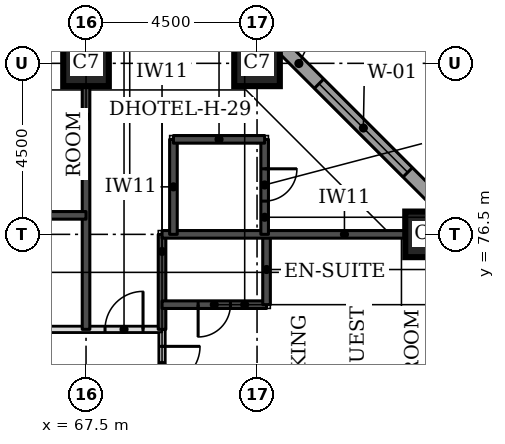
"""IFC4 building model, lengths in metres.
Left out: names, types, materials, properties, quantities, classifications, styles, units other than length and angle.
Written with IfcOpenShell. Run it as: python <this file> out.ifc"""

import sys

from ifc_helpers import new_model, si_unit, direction, frame, frame_2d, origin, origin_2d, place, context, subcontext, project, spatial, rectangle, extrude, element, fill, save


model = new_model("IFC4")
c1 = context("Model", 3, precision=1e-05, world=origin(), true_north=direction((0.0, 1.0)))
c2 = subcontext(c1, "Body", "Model", "MODEL_VIEW")
j1 = project(units=[si_unit("LENGTHUNIT", "METRE"), si_unit("PLANEANGLEUNIT", "RADIAN")], contexts=[c1])
p1 = place(None, origin())
s1 = spatial("IfcSite", under=j1, at=p1, CompositionType="ELEMENT")
p2 = place(p1, origin())
s2 = spatial("IfcBuilding", under=s1, at=p2, CompositionType="ELEMENT")
p3 = place(p2, frame((0.0, 0.0, 46.2)))
s3 = spatial("IfcBuildingStorey", under=s2, at=p3, CompositionType="ELEMENT", Elevation=46.2)
for number, where, z_axis, x_axis in (
    (1, (76.5, 76.5, 0.0), (0.0, 0.0, 1.0), (1.0, 0.0, 0.0)),
    (2, (67.5, 81.0, 0.0), (0.0, 0.0, 1.0), (1.0, 0.0, 0.0)),
    (3, (72.0, 81.0, 0.0), (0.0, 0.0, 1.0), (1.0, 0.0, 0.0)),
):
    element("IfcColumn", number, at=place(p3, frame(where, z_axis=z_axis, x_axis=x_axis)), inside=s3, PredefinedType="COLUMN", context=c2, shape_type="SweptSolid", body=[
        extrude(rectangle(XDim=1.2, YDim=1.2, at=origin_2d()), origin(), (0.0, 0.0, 1.0), 3.3),
    ])
p4 = place(p3, frame((77.326, 76.77, 0.0), z_axis=(0.0, 0.0, 1.0), x_axis=(-0.707106781187, 0.707106781187, 0.0)))
e4 = element("IfcWall", 4, at=p4, inside=s3, PredefinedType="STANDARD", context=c2, shape_type="SweptSolid", body=[
    extrude(rectangle(XDim=7.151, YDim=0.35, at=frame_2d((3.576, 0.0))), origin(), (0.0, 0.0, 1.0), 3.055),
])
p5 = place(p4, frame((1.926, 0.0, 0.8)))
e5 = element("IfcOpeningElement", 5, at=p5, cuts=e4, PredefinedType="OPENING", context=c2, shape_type="SweptSolid", body=[
    extrude(rectangle(XDim=3.3, YDim=1.5, at=frame_2d((1.65, 0.75))), frame((0.0, 0.185, 0.0), z_axis=(0.0, -1.0, 0.0), x_axis=(1.0, 0.0, 0.0)), (0.0, 0.0, 1.0), 0.37),
])
p6 = place(p3, frame((69.5, 47.5, 0.0), z_axis=(0.0, 0.0, 1.0), x_axis=(0.0, 1.0, 0.0)))
e6 = element("IfcWall", 6, at=p6, inside=s3, PredefinedType="PARTITIONING", context=c2, shape_type="SweptSolid", body=[
    extrude(rectangle(XDim=26.5, YDim=0.15, at=frame_2d((13.25, 0.0))), origin(), (0.0, 0.0, 1.0), 3.08),
])
p7 = place(p6, frame((25.053, 0.0, 0.0)))
e7 = element("IfcOpeningElement", 7, at=p7, cuts=e6, PredefinedType="OPENING", context=c2, shape_type="SweptSolid", body=[
    extrude(rectangle(XDim=1.0, YDim=2.1, at=frame_2d((0.5, 1.05))), frame((0.0, 0.085, 0.0), z_axis=(0.0, -1.0, 0.0), x_axis=(1.0, 0.0, 0.0)), (0.0, 0.0, 1.0), 0.17),
])
p8 = place(p6, frame((20.575, 0.0, 0.0)))
e8 = element("IfcOpeningElement", 8, at=p8, cuts=e6, PredefinedType="OPENING", context=c2, shape_type="SweptSolid", body=[
    extrude(rectangle(XDim=1.0, YDim=2.1, at=frame_2d((0.5, 1.05))), frame((0.0, 0.085, 0.0), z_axis=(0.0, -1.0, 0.0), x_axis=(1.0, 0.0, 0.0)), (0.0, 0.0, 1.0), 0.17),
])
p9 = place(p6, frame((18.175, 0.0, 0.0)))
e9 = element("IfcOpeningElement", 9, at=p9, cuts=e6, PredefinedType="OPENING", context=c2, shape_type="SweptSolid", body=[
    extrude(rectangle(XDim=1.0, YDim=2.1, at=frame_2d((0.5, 1.05))), frame((0.0, 0.085, 0.0), z_axis=(0.0, -1.0, 0.0), x_axis=(1.0, 0.0, 0.0)), (0.0, 0.0, 1.0), 0.17),
])
p10 = place(p6, frame((11.575, 0.0, 0.0)))
e10 = element("IfcOpeningElement", 10, at=p10, cuts=e6, PredefinedType="OPENING", context=c2, shape_type="SweptSolid", body=[
    extrude(rectangle(XDim=1.0, YDim=2.1, at=frame_2d((0.5, 1.05))), frame((0.0, 0.085, 0.0), z_axis=(0.0, -1.0, 0.0), x_axis=(1.0, 0.0, 0.0)), (0.0, 0.0, 1.0), 0.17),
])
p11 = place(p6, frame((7.65, 0.0, 0.0)))
e11 = element("IfcOpeningElement", 11, at=p11, cuts=e6, PredefinedType="OPENING", context=c2, shape_type="SweptSolid", body=[
    extrude(rectangle(XDim=1.1, YDim=2.1, at=frame_2d((0.55, 1.05))), frame((0.0, 0.085, 0.0), z_axis=(0.0, -1.0, 0.0), x_axis=(1.0, 0.0, 0.0)), (0.0, 0.0, 1.0), 0.17),
])
p12 = place(p6, frame((0.447, 0.0, 0.0)))
e12 = element("IfcOpeningElement", 12, at=p12, cuts=e6, PredefinedType="OPENING", context=c2, shape_type="SweptSolid", body=[
    extrude(rectangle(XDim=1.0, YDim=2.1, at=frame_2d((0.5, 1.05))), frame((0.0, 0.085, 0.0), z_axis=(0.0, -1.0, 0.0), x_axis=(1.0, 0.0, 0.0)), (0.0, 0.0, 1.0), 0.17),
])
p13 = place(p3, frame((43.0, 74.0, 0.0), z_axis=(0.0, 0.0, 1.0), x_axis=(1.0, 0.0, 0.0)))
e13 = element("IfcWall", 13, at=p13, inside=s3, PredefinedType="PARTITIONING", context=c2, shape_type="SweptSolid", body=[
    extrude(rectangle(XDim=26.5, YDim=0.15, at=frame_2d((13.25, 0.0))), origin(), (0.0, 0.0, 1.0), 3.08),
])
p14 = place(p13, frame((2.575, 0.0, 0.0)))
e14 = element("IfcOpeningElement", 14, at=p14, cuts=e13, PredefinedType="OPENING", context=c2, shape_type="SweptSolid", body=[
    extrude(rectangle(XDim=1.0, YDim=2.1, at=frame_2d((0.5, 1.05))), frame((0.0, 0.085, 0.0), z_axis=(0.0, -1.0, 0.0), x_axis=(1.0, 0.0, 0.0)), (0.0, 0.0, 1.0), 0.17),
])
p15 = place(p13, frame((9.175, 0.0, 0.0)))
e15 = element("IfcOpeningElement", 15, at=p15, cuts=e13, PredefinedType="OPENING", context=c2, shape_type="SweptSolid", body=[
    extrude(rectangle(XDim=1.0, YDim=2.1, at=frame_2d((0.5, 1.05))), frame((0.0, 0.085, 0.0), z_axis=(0.0, -1.0, 0.0), x_axis=(1.0, 0.0, 0.0)), (0.0, 0.0, 1.0), 0.17),
])
p16 = place(p13, frame((11.575, 0.0, 0.0)))
e16 = element("IfcOpeningElement", 16, at=p16, cuts=e13, PredefinedType="OPENING", context=c2, shape_type="SweptSolid", body=[
    extrude(rectangle(XDim=1.0, YDim=2.1, at=frame_2d((0.5, 1.05))), frame((0.0, 0.085, 0.0), z_axis=(0.0, -1.0, 0.0), x_axis=(1.0, 0.0, 0.0)), (0.0, 0.0, 1.0), 0.17),
])
p17 = place(p13, frame((18.175, 0.0, 0.0)))
e17 = element("IfcOpeningElement", 17, at=p17, cuts=e13, PredefinedType="OPENING", context=c2, shape_type="SweptSolid", body=[
    extrude(rectangle(XDim=1.0, YDim=2.1, at=frame_2d((0.5, 1.05))), frame((0.0, 0.085, 0.0), z_axis=(0.0, -1.0, 0.0), x_axis=(1.0, 0.0, 0.0)), (0.0, 0.0, 1.0), 0.17),
])
p18 = place(p13, frame((20.575, 0.0, 0.0)))
e18 = element("IfcOpeningElement", 18, at=p18, cuts=e13, PredefinedType="OPENING", context=c2, shape_type="SweptSolid", body=[
    extrude(rectangle(XDim=1.0, YDim=2.1, at=frame_2d((0.5, 1.05))), frame((0.0, 0.085, 0.0), z_axis=(0.0, -1.0, 0.0), x_axis=(1.0, 0.0, 0.0)), (0.0, 0.0, 1.0), 0.17),
])
p19 = place(p13, frame((0.5, 0.0, 0.0)))
e19 = element("IfcOpeningElement", 19, at=p19, cuts=e13, PredefinedType="OPENING", context=c2, shape_type="SweptSolid", body=[
    extrude(rectangle(XDim=1.0, YDim=2.1, at=frame_2d((0.5, 1.05))), frame((0.0, 0.085, 0.0), z_axis=(0.0, -1.0, 0.0), x_axis=(1.0, 0.0, 0.0)), (0.0, 0.0, 1.0), 0.17),
])
p20 = place(p13, frame((25.0, 0.0, 0.0)))
e20 = element("IfcOpeningElement", 20, at=p20, cuts=e13, PredefinedType="OPENING", context=c2, shape_type="SweptSolid", body=[
    extrude(rectangle(XDim=1.0, YDim=2.1, at=frame_2d((0.5, 1.05))), frame((0.0, 0.085, 0.0), z_axis=(0.0, -1.0, 0.0), x_axis=(1.0, 0.0, 0.0)), (0.0, 0.0, 1.0), 0.17),
])
p21 = place(p3, frame((67.5, 74.0, 0.0), z_axis=(0.0, 0.0, 1.0), x_axis=(0.0, 1.0, 0.0)))
e21 = element("IfcWall", 21, at=p21, inside=s3, PredefinedType="SOLIDWALL", context=c2, shape_type="SweptSolid", body=[
    extrude(rectangle(XDim=6.4, YDim=0.2, at=frame_2d((3.2, 0.0))), origin(), (0.0, 0.0, 1.0), 3.08),
])
p22 = place(p3, frame((69.5, 74.0, 0.0), z_axis=(0.0, 0.0, 1.0), x_axis=(0.0, 1.0, 0.0)))
e22 = element("IfcWall", 22, at=p22, inside=s3, PredefinedType="SOLIDWALL", context=c2, shape_type="SweptSolid", body=[
    extrude(rectangle(XDim=2.5, YDim=0.2, at=frame_2d((1.25, 0.0))), origin(), (0.0, 0.0, 1.0), 3.08),
])
p23 = place(p3, frame((69.5, 74.65, 0.0), z_axis=(0.0, 0.0, 1.0), x_axis=(1.0, 0.0, 0.0)))
e23 = element("IfcWall", 23, at=p23, inside=s3, PredefinedType="SOLIDWALL", context=c2, shape_type="SweptSolid", body=[
    extrude(rectangle(XDim=2.75, YDim=0.2, at=frame_2d((1.375, 0.0))), origin(), (0.0, 0.0, 1.0), 3.08),
])
p24 = place(p23, frame((0.95, 0.0, 0.0)))
e24 = element("IfcOpeningElement", 24, at=p24, cuts=e23, PredefinedType="OPENING", context=c2, shape_type="SweptSolid", body=[
    extrude(rectangle(XDim=0.85, YDim=2.1, at=frame_2d((0.425, 1.05))), frame((0.0, 0.11, 0.0), z_axis=(0.0, -1.0, 0.0), x_axis=(1.0, 0.0, 0.0)), (0.0, 0.0, 1.0), 0.22),
])
p25 = place(p3, frame((72.25, 74.65, 0.0), z_axis=(0.0, 0.0, 1.0), x_axis=(0.0, 1.0, 0.0)))
e25 = element("IfcWall", 25, at=p25, inside=s3, PredefinedType="SOLIDWALL", context=c2, shape_type="SweptSolid", body=[
    extrude(rectangle(XDim=1.85, YDim=0.2, at=frame_2d((0.925, 0.0))), origin(), (0.0, 0.0, 1.0), 3.08),
])
p26 = place(p3, frame((69.5, 76.5, 0.0), z_axis=(0.0, 0.0, 1.0), x_axis=(1.0, 0.0, 0.0)))
e26 = element("IfcWall", 26, at=p26, inside=s3, PredefinedType="SOLIDWALL", context=c2, shape_type="SweptSolid", body=[
    extrude(rectangle(XDim=6.4, YDim=0.2, at=frame_2d((3.2, 0.0))), origin(), (0.0, 0.0, 1.0), 3.08),
])
p27 = place(p3, frame((69.8, 76.5, 0.0), z_axis=(0.0, 0.0, 1.0), x_axis=(0.0, 1.0, 0.0)))
e27 = element("IfcWall", 27, at=p27, inside=s3, PredefinedType="SOLIDWALL", context=c2, shape_type="SweptSolid", body=[
    extrude(rectangle(XDim=2.5, YDim=0.2, at=frame_2d((1.25, 0.0))), origin(), (0.0, 0.0, 1.0), 3.08),
])
p28 = place(p3, frame((72.2, 76.5, 0.0), z_axis=(0.0, 0.0, 1.0), x_axis=(0.0, 1.0, 0.0)))
e28 = element("IfcWall", 28, at=p28, inside=s3, PredefinedType="SOLIDWALL", context=c2, shape_type="SweptSolid", body=[
    extrude(rectangle(XDim=2.5, YDim=0.2, at=frame_2d((1.25, 0.0))), origin(), (0.0, 0.0, 1.0), 3.08),
])
p29 = place(p28, frame((0.875, 0.0, 0.0)))
e29 = element("IfcOpeningElement", 29, at=p29, cuts=e28, PredefinedType="OPENING", context=c2, shape_type="SweptSolid", body=[
    extrude(rectangle(XDim=0.85, YDim=2.1, at=frame_2d((0.425, 1.05))), frame((0.0, 0.11, 0.0), z_axis=(0.0, -1.0, 0.0), x_axis=(1.0, 0.0, 0.0)), (0.0, 0.0, 1.0), 0.22),
])
p30 = place(p3, frame((65.15, 77.0, 0.0), z_axis=(0.0, 0.0, 1.0), x_axis=(1.0, 0.0, 0.0)))
e30 = element("IfcWall", 30, at=p30, inside=s3, PredefinedType="SOLIDWALL", context=c2, shape_type="SweptSolid", body=[
    extrude(rectangle(XDim=2.35, YDim=0.2, at=frame_2d((1.175, 0.0))), origin(), (0.0, 0.0, 1.0), 3.08),
])
p31 = place(p3, frame((69.8, 79.0, 0.0), z_axis=(0.0, 0.0, 1.0), x_axis=(1.0, 0.0, 0.0)))
e31 = element("IfcWall", 31, at=p31, inside=s3, PredefinedType="SOLIDWALL", context=c2, shape_type="SweptSolid", body=[
    extrude(rectangle(XDim=2.4, YDim=0.2, at=frame_2d((1.2, 0.0))), origin(), (0.0, 0.0, 1.0), 3.08),
])
p32 = place(p5, origin())
e32 = element("IfcWindow", 32, at=p32, inside=s3, PartitioningType="SINGLE_PANEL", PredefinedType="WINDOW", context=c2, shape_type="SweptSolid", body=[
    extrude(rectangle(XDim=3.3, YDim=1.5, at=frame_2d((1.65, 0.75))), frame((0.0, 0.085, 0.0), z_axis=(0.0, -1.0, 0.0), x_axis=(1.0, 0.0, 0.0)), (0.0, 0.0, 1.0), 0.06),
])
fill(e5, e32)
p33 = place(p7, frame((1.0, 0.0, 0.0), z_axis=(0.0, 0.0, 1.0), x_axis=(-1.0, 0.0, 0.0)))
e33 = element("IfcDoor", 33, at=p33, inside=s3, OperationType="SINGLE_SWING_LEFT", PredefinedType="DOOR", context=c2, shape_type="SweptSolid", body=[
    extrude(rectangle(XDim=1.0, YDim=2.1, at=frame_2d((0.5, 1.05))), frame((0.0, 0.025, 0.0), z_axis=(0.0, -1.0, 0.0), x_axis=(1.0, 0.0, 0.0)), (0.0, 0.0, 1.0), 0.05),
])
fill(e7, e33)
p34 = place(p24, frame((0.85, 0.0, 0.0), z_axis=(0.0, 0.0, 1.0), x_axis=(-1.0, 0.0, 0.0)))
e34 = element("IfcDoor", 34, at=p34, inside=s3, OperationType="SINGLE_SWING_RIGHT", PredefinedType="DOOR", context=c2, shape_type="SweptSolid", body=[
    extrude(rectangle(XDim=0.85, YDim=2.1, at=frame_2d((0.425, 1.05))), frame((0.0, 0.025, 0.0), z_axis=(0.0, -1.0, 0.0), x_axis=(1.0, 0.0, 0.0)), (0.0, 0.0, 1.0), 0.05),
])
fill(e24, e34)
p35 = place(p20, origin())
e35 = element("IfcDoor", 35, at=p35, inside=s3, OperationType="SINGLE_SWING_RIGHT", PredefinedType="DOOR", context=c2, shape_type="SweptSolid", body=[
    extrude(rectangle(XDim=1.0, YDim=2.1, at=frame_2d((0.5, 1.05))), frame((0.0, 0.025, 0.0), z_axis=(0.0, -1.0, 0.0), x_axis=(1.0, 0.0, 0.0)), (0.0, 0.0, 1.0), 0.05),
])
fill(e20, e35)
p36 = place(p29, frame((0.85, 0.0, 0.0), z_axis=(0.0, 0.0, 1.0), x_axis=(-1.0, 0.0, 0.0)))
e36 = element("IfcDoor", 36, at=p36, inside=s3, OperationType="SINGLE_SWING_LEFT", PredefinedType="DOOR", context=c2, shape_type="SweptSolid", body=[
    extrude(rectangle(XDim=0.85, YDim=2.1, at=frame_2d((0.425, 1.05))), frame((0.0, 0.025, 0.0), z_axis=(0.0, -1.0, 0.0), x_axis=(1.0, 0.0, 0.0)), (0.0, 0.0, 1.0), 0.05),
])
fill(e29, e36)
save(model, sys.argv[1])
